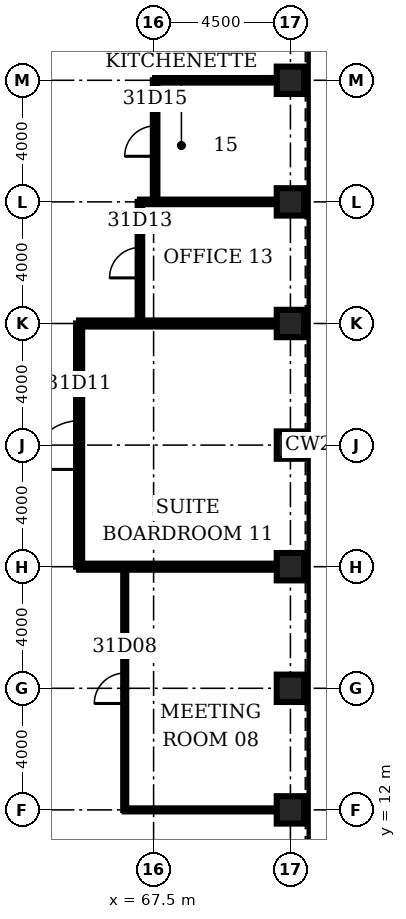
"""IFC4 building model, lengths in metres.
Left out: names, types, materials, properties, quantities, classifications, styles, units other than length and angle.
Written with IfcOpenShell. Run it as: python <this file> out.ifc"""

import sys

from ifc_helpers import new_model, si_unit, direction, frame, frame_2d, origin, origin_2d, place, context, subcontext, project, spatial, rectangle, hollow_rectangle, extrude, element, fill, save


model = new_model("IFC4")
c1 = context("Model", 3, precision=1e-05, world=origin(), true_north=direction((0.0, 1.0)))
c2 = subcontext(c1, "Body", "Model", "MODEL_VIEW")
j1 = project(units=[si_unit("LENGTHUNIT", "METRE"), si_unit("PLANEANGLEUNIT", "RADIAN")], contexts=[c1])
p1 = place(None, origin())
s1 = spatial("IfcSite", under=j1, at=p1, CompositionType="ELEMENT")
p2 = place(p1, origin())
s2 = spatial("IfcBuilding", under=s1, at=p2, CompositionType="ELEMENT")
p3 = place(p2, frame((0.0, 0.0, 142.5)))
s3 = spatial("IfcBuildingStorey", under=s2, at=p3, CompositionType="ELEMENT", Elevation=142.5)
for number, where, z_axis, x_axis in (
    (1, (72.0, 12.0, 0.0), (0.0, 0.0, 1.0), (1.0, 0.0, 0.0)),
    (2, (72.0, 16.0, 0.0), (0.0, 0.0, 1.0), (1.0, 0.0, 0.0)),
    (3, (72.0, 20.0, 0.0), (0.0, 0.0, 1.0), (1.0, 0.0, 0.0)),
    (4, (72.0, 24.0, 0.0), (0.0, 0.0, 1.0), (1.0, 0.0, 0.0)),
    (5, (72.0, 28.0, 0.0), (0.0, 0.0, 1.0), (1.0, 0.0, 0.0)),
    (6, (72.0, 32.0, 0.0), (0.0, 0.0, 1.0), (1.0, 0.0, 0.0)),
    (7, (72.0, 36.0, 0.0), (0.0, 0.0, 1.0), (1.0, 0.0, 0.0)),
):
    element("IfcColumn", number, at=place(p3, frame(where, z_axis=z_axis, x_axis=x_axis)), inside=s3, PredefinedType="COLUMN", context=c2, shape_type="SweptSolid", body=[
        extrude(hollow_rectangle(XDim=0.9, YDim=0.9, WallThickness=0.1, at=origin_2d()), origin(), (0.0, 0.0, 1.0), 4.2),
    ])
p4 = place(p3, frame((66.55, 12.0, 0.0), z_axis=(0.0, 0.0, 1.0), x_axis=(1.0, 0.0, 0.0)))
e8 = element("IfcWall", 8, at=p4, inside=s3, PredefinedType="PARTITIONING", context=c2, shape_type="SweptSolid", body=[
    extrude(rectangle(XDim=5.0, YDim=0.1, at=frame_2d((2.5, 0.0))), origin(), (0.0, 0.0, 1.0), 3.0),
])
for number, where, z_axis, x_axis in (
    (9, (65.05, 20.0, 0.0), (0.0, 0.0, 1.0), (1.0, 0.0, 0.0)),
    (10, (65.05, 28.0, 0.0), (0.0, 0.0, 1.0), (1.0, 0.0, 0.0)),
):
    element("IfcWall", number, at=place(p3, frame(where, z_axis=z_axis, x_axis=x_axis)), inside=s3, PredefinedType="PARTITIONING", context=c2, shape_type="SweptSolid", body=[
        extrude(rectangle(XDim=6.5, YDim=0.2, at=frame_2d((3.25, 0.0))), origin(), (0.0, 0.0, 1.0), 3.0),
    ])
p5 = place(p3, frame((67.05, 32.0, 0.0), z_axis=(0.0, 0.0, 1.0), x_axis=(1.0, 0.0, 0.0)))
e11 = element("IfcWall", 11, at=p5, inside=s3, PredefinedType="PARTITIONING", context=c2, shape_type="SweptSolid", body=[
    extrude(rectangle(XDim=4.5, YDim=0.15, at=frame_2d((2.25, 0.0))), origin(), (0.0, 0.0, 1.0), 3.0),
])
p6 = place(p3, frame((67.55, 36.0, 0.0), z_axis=(0.0, 0.0, 1.0), x_axis=(1.0, 0.0, 0.0)))
e12 = element("IfcWall", 12, at=p6, inside=s3, PredefinedType="PARTITIONING", context=c2, shape_type="SweptSolid", body=[
    extrude(rectangle(XDim=4.0, YDim=0.15, at=frame_2d((2.0, 0.0))), origin(), (0.0, 0.0, 1.0), 3.0),
])
p7 = place(p3, frame((65.05, 20.0, 0.0), z_axis=(0.0, 0.0, 1.0), x_axis=(0.0, 1.0, 0.0)))
e13 = element("IfcWall", 13, at=p7, inside=s3, PredefinedType="PARTITIONING", context=c2, shape_type="SweptSolid", body=[
    extrude(rectangle(XDim=8.0, YDim=0.2, at=frame_2d((4.0, 0.0))), origin(), (0.0, 0.0, 1.0), 3.0),
])
p8 = place(p7, frame((3.2, 0.0, 0.0)))
e14 = element("IfcOpeningElement", 14, at=p8, cuts=e13, PredefinedType="OPENING", context=c2, shape_type="SweptSolid", body=[
    extrude(rectangle(XDim=1.6, YDim=2.1, at=frame_2d((0.8, 1.05))), frame((0.0, 0.11, 0.0), z_axis=(0.0, -1.0, 0.0), x_axis=(1.0, 0.0, 0.0)), (0.0, 0.0, 1.0), 0.22),
])
p9 = place(p3, frame((66.55, 12.0, 0.0), z_axis=(0.0, 0.0, 1.0), x_axis=(0.0, 1.0, 0.0)))
e15 = element("IfcWall", 15, at=p9, inside=s3, PredefinedType="PARTITIONING", context=c2, shape_type="SweptSolid", body=[
    extrude(rectangle(XDim=8.0, YDim=0.1, at=frame_2d((4.0, 0.0))), origin(), (0.0, 0.0, 1.0), 3.0),
])
p10 = place(p9, frame((3.5, 0.0, 0.0)))
e16 = element("IfcOpeningElement", 16, at=p10, cuts=e15, PredefinedType="OPENING", context=c2, shape_type="SweptSolid", body=[
    extrude(rectangle(XDim=1.0, YDim=2.1, at=frame_2d((0.5, 1.05))), frame((0.0, 0.06, 0.0), z_axis=(0.0, -1.0, 0.0), x_axis=(1.0, 0.0, 0.0)), (0.0, 0.0, 1.0), 0.12),
])
p11 = place(p3, frame((67.05, 28.0, 0.0), z_axis=(0.0, 0.0, 1.0), x_axis=(0.0, 1.0, 0.0)))
e17 = element("IfcWall", 17, at=p11, inside=s3, PredefinedType="PARTITIONING", context=c2, shape_type="SweptSolid", body=[
    extrude(rectangle(XDim=4.0, YDim=0.15, at=frame_2d((2.0, 0.0))), origin(), (0.0, 0.0, 1.0), 3.0),
])
p12 = place(p11, frame((1.5, 0.0, 0.0)))
e18 = element("IfcOpeningElement", 18, at=p12, cuts=e17, PredefinedType="OPENING", context=c2, shape_type="SweptSolid", body=[
    extrude(rectangle(XDim=1.0, YDim=2.1, at=frame_2d((0.5, 1.05))), frame((0.0, 0.085, 0.0), z_axis=(0.0, -1.0, 0.0), x_axis=(1.0, 0.0, 0.0)), (0.0, 0.0, 1.0), 0.17),
])
p13 = place(p3, frame((67.55, 32.0, 0.0), z_axis=(0.0, 0.0, 1.0), x_axis=(0.0, 1.0, 0.0)))
e19 = element("IfcWall", 19, at=p13, inside=s3, PredefinedType="PARTITIONING", context=c2, shape_type="SweptSolid", body=[
    extrude(rectangle(XDim=4.0, YDim=0.15, at=frame_2d((2.0, 0.0))), origin(), (0.0, 0.0, 1.0), 3.0),
])
p14 = place(p13, frame((1.5, 0.0, 0.0)))
e20 = element("IfcOpeningElement", 20, at=p14, cuts=e19, PredefinedType="OPENING", context=c2, shape_type="SweptSolid", body=[
    extrude(rectangle(XDim=1.0, YDim=2.1, at=frame_2d((0.5, 1.05))), frame((0.0, 0.085, 0.0), z_axis=(0.0, -1.0, 0.0), x_axis=(1.0, 0.0, 0.0)), (0.0, 0.0, 1.0), 0.17),
])
p15 = place(p10, origin())
e21 = element("IfcDoor", 21, at=p15, inside=s3, OperationType="SINGLE_SWING_LEFT", PredefinedType="DOOR", context=c2, shape_type="SweptSolid", body=[
    extrude(rectangle(XDim=1.0, YDim=2.1, at=frame_2d((0.5, 1.05))), frame((0.0, 0.025, 0.0), z_axis=(0.0, -1.0, 0.0), x_axis=(1.0, 0.0, 0.0)), (0.0, 0.0, 1.0), 0.05),
])
fill(e16, e21)
p16 = place(p8, origin())
e22 = element("IfcDoor", 22, at=p16, inside=s3, OperationType="SINGLE_SWING_LEFT", PredefinedType="DOOR", context=c2, shape_type="SweptSolid", body=[
    extrude(rectangle(XDim=1.6, YDim=2.1, at=frame_2d((0.8, 1.05))), frame((0.0, 0.025, 0.0), z_axis=(0.0, -1.0, 0.0), x_axis=(1.0, 0.0, 0.0)), (0.0, 0.0, 1.0), 0.05),
])
fill(e14, e22)
p17 = place(p12, origin())
e23 = element("IfcDoor", 23, at=p17, inside=s3, OperationType="SINGLE_SWING_LEFT", PredefinedType="DOOR", context=c2, shape_type="SweptSolid", body=[
    extrude(rectangle(XDim=1.0, YDim=2.1, at=frame_2d((0.5, 1.05))), frame((0.0, 0.025, 0.0), z_axis=(0.0, -1.0, 0.0), x_axis=(1.0, 0.0, 0.0)), (0.0, 0.0, 1.0), 0.05),
])
fill(e18, e23)
p18 = place(p14, origin())
e24 = element("IfcDoor", 24, at=p18, inside=s3, OperationType="SINGLE_SWING_LEFT", PredefinedType="DOOR", context=c2, shape_type="SweptSolid", body=[
    extrude(rectangle(XDim=1.0, YDim=2.1, at=frame_2d((0.5, 1.05))), frame((0.0, 0.025, 0.0), z_axis=(0.0, -1.0, 0.0), x_axis=(1.0, 0.0, 0.0)), (0.0, 0.0, 1.0), 0.05),
])
fill(e20, e24)
save(model, sys.argv[1])
